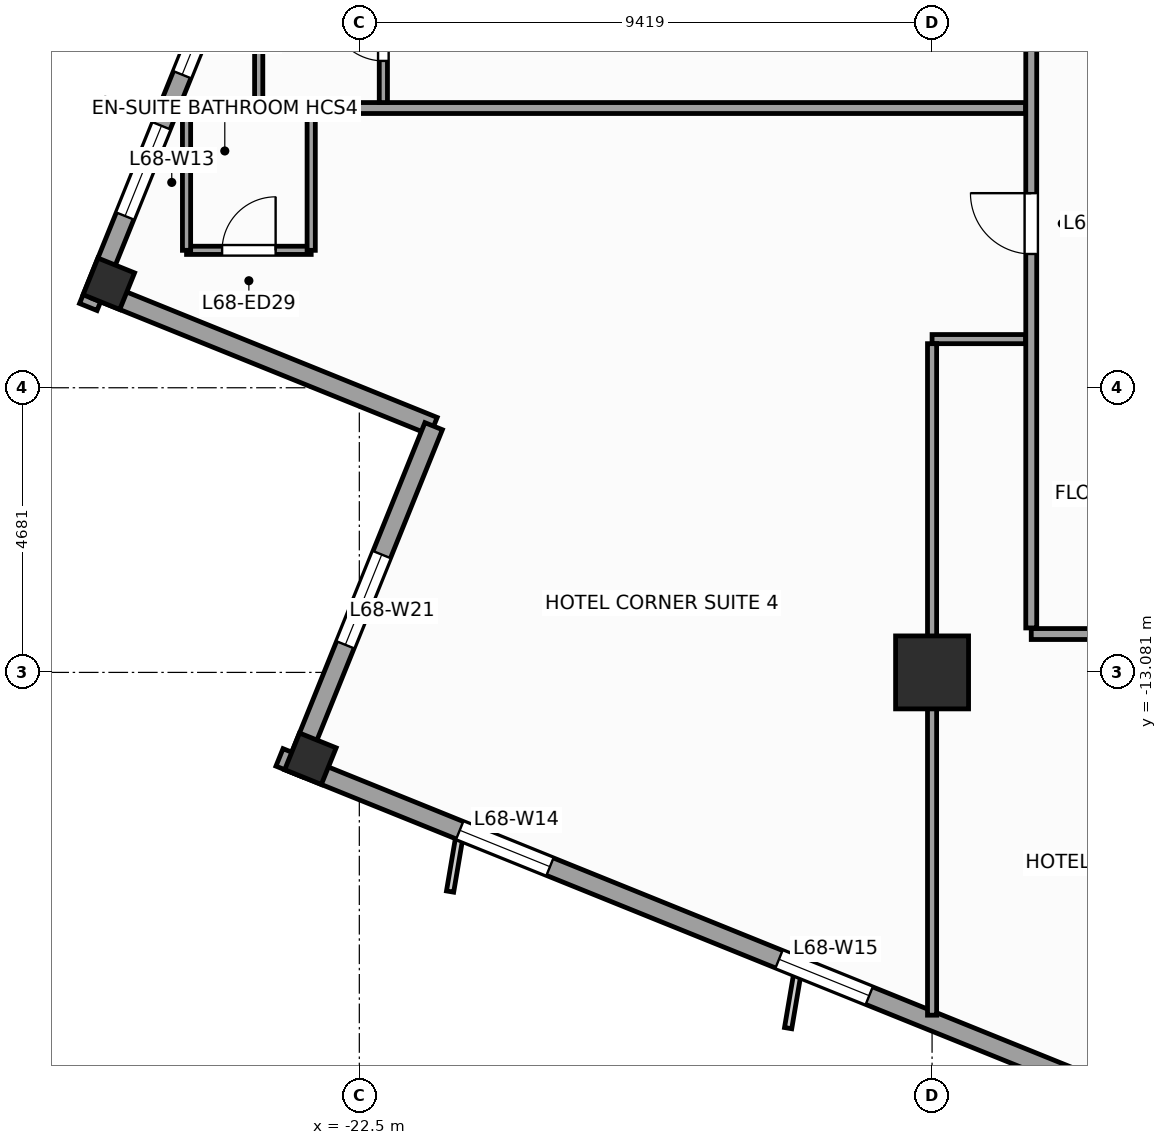
"""IFC4 building model, lengths in metres.
Left out: names, types, materials, properties, quantities, classifications, styles, units other than length and angle.
Written with IfcOpenShell. Run it as: python <this file> out.ifc"""

import sys

from ifc_helpers import new_model, si_unit, direction, frame, frame_2d, origin, origin_2d, place, context, subcontext, project, spatial, rectangle, extrude, source, transform, mapped, element, fill, save


model = new_model("IFC4")
c1 = context("Model", 3, precision=1e-05, world=origin(), true_north=direction((0.0, 1.0)))
c2 = subcontext(c1, "Body", "Model", "MODEL_VIEW")
j1 = project(units=[si_unit("LENGTHUNIT", "METRE"), si_unit("PLANEANGLEUNIT", "RADIAN")], contexts=[c1])
p1 = place(None, origin())
s1 = spatial("IfcSite", under=j1, at=p1, CompositionType="ELEMENT")
p2 = place(p1, origin())
s2 = spatial("IfcBuilding", under=s1, at=p2, CompositionType="ELEMENT")
p3 = place(p2, frame((0.0, 0.0, 279.6)))
s3 = spatial("IfcBuildingStorey", under=s2, at=p3, CompositionType="ELEMENT", Elevation=279.6)
m1 = source(origin(), c2, "Body", "SweptSolid", [
    extrude(rectangle(XDim=1.2, YDim=1.2, at=origin_2d()), origin(), (0.0, 0.0, 1.0), 3.6),
])
p4 = place(p3, frame((-13.081, -13.081, 0.0), z_axis=(0.0, 0.0, 1.0), x_axis=(1.0, 0.0, 0.0)))
e1 = element("IfcColumn", 1, at=p4, inside=s3, PredefinedType="COLUMN", context=c2, shape_type="MappedRepresentation", body=[
    mapped(m1, transform((0.0, 0.0, 0.0), scale=1.0)),
])
m2 = source(origin(), c2, "Body", "SweptSolid", [
    extrude(rectangle(XDim=0.65, YDim=0.65, at=origin_2d()), origin(), (0.0, 0.0, 1.0), 3.6),
])
for number, where, z_axis, x_axis in (
    (2, (-26.62, -6.69, 0.0), (0.0, 0.0, 1.0), (0.375, 0.927, 0.0)),
    (3, (-23.304, -14.501, 0.0), (0.0, 0.0, 1.0), (0.375, 0.927, 0.0)),
):
    element("IfcColumn", number, at=place(p3, frame(where, z_axis=z_axis, x_axis=x_axis)), inside=s3, PredefinedType="COLUMN", context=c2, shape_type="MappedRepresentation", body=[
        mapped(m2, transform((0.0, 0.0, 0.0), scale=1.0)),
    ])
p5 = place(p3, frame((-14.479, 23.813, 0.0), z_axis=(0.0, 0.0, 1.0), x_axis=(-0.374609557019, -0.927182657188, 0.0)))
e4 = element("IfcWall", 4, at=p5, inside=s3, PredefinedType="STANDARD", context=c2, shape_type="SweptSolid", body=[
    extrude(rectangle(XDim=33.31, YDim=0.31, at=frame_2d((16.655, 0.0))), origin(), (0.0, 0.0, 1.0), 2.75),
])
p6 = place(p5, frame((21.73, 0.0, 0.0)))
e5 = element("IfcOpeningElement", 5, at=p6, cuts=e4, PredefinedType="OPENING", context=c2, shape_type="SweptSolid", body=[
    extrude(rectangle(XDim=1.05, YDim=2.25, at=frame_2d((0.525, 1.125))), frame((0.0, 0.165, 0.0), z_axis=(0.0, -1.0, 0.0), x_axis=(1.0, 0.0, 0.0)), (0.0, 0.0, 1.0), 0.33),
])
p7 = place(p5, frame((3.197, 0.0, 0.47)))
e6 = element("IfcOpeningElement", 6, at=p7, cuts=e4, PredefinedType="OPENING", context=c2, shape_type="SweptSolid", body=[
    extrude(rectangle(XDim=1.6, YDim=2.1, at=frame_2d((0.8, 1.05))), frame((0.0, 0.165, 0.0), z_axis=(0.0, -1.0, 0.0), x_axis=(1.0, 0.0, 0.0)), (0.0, 0.0, 1.0), 0.33),
])
p8 = place(p5, frame((8.86, 0.0, 0.47)))
e7 = element("IfcOpeningElement", 7, at=p8, cuts=e4, PredefinedType="OPENING", context=c2, shape_type="SweptSolid", body=[
    extrude(rectangle(XDim=1.6, YDim=2.1, at=frame_2d((0.8, 1.05))), frame((0.0, 0.165, 0.0), z_axis=(0.0, -1.0, 0.0), x_axis=(1.0, 0.0, 0.0)), (0.0, 0.0, 1.0), 0.33),
])
p9 = place(p5, frame((14.439, 0.0, 0.47)))
e8 = element("IfcOpeningElement", 8, at=p9, cuts=e4, PredefinedType="OPENING", context=c2, shape_type="SweptSolid", body=[
    extrude(rectangle(XDim=1.6, YDim=2.1, at=frame_2d((0.8, 1.05))), frame((0.0, 0.165, 0.0), z_axis=(0.0, -1.0, 0.0), x_axis=(1.0, 0.0, 0.0)), (0.0, 0.0, 1.0), 0.33),
])
p10 = place(p5, frame((30.097, 0.0, 0.47)))
e9 = element("IfcOpeningElement", 9, at=p10, cuts=e4, PredefinedType="OPENING", context=c2, shape_type="SweptSolid", body=[
    extrude(rectangle(XDim=1.6, YDim=2.1, at=frame_2d((0.8, 1.05))), frame((0.0, 0.165, 0.0), z_axis=(0.0, -1.0, 0.0), x_axis=(1.0, 0.0, 0.0)), (0.0, 0.0, 1.0), 0.33),
])
p11 = place(p5, frame((27.59, 0.0, 0.47)))
e10 = element("IfcOpeningElement", 10, at=p11, cuts=e4, PredefinedType="OPENING", context=c2, shape_type="SweptSolid", body=[
    extrude(rectangle(XDim=1.6, YDim=2.1, at=frame_2d((0.8, 1.05))), frame((0.0, 0.165, 0.0), z_axis=(0.0, -1.0, 0.0), x_axis=(1.0, 0.0, 0.0)), (0.0, 0.0, 1.0), 0.33),
])
p12 = place(p3, frame((-26.841, -6.784, 0.0), z_axis=(0.0, 0.0, 1.0), x_axis=(0.927171722085, -0.374636620962, 0.0)))
e11 = element("IfcWall", 11, at=p12, inside=s3, PredefinedType="STANDARD", context=c2, shape_type="SweptSolid", body=[
    extrude(rectangle(XDim=6.0, YDim=0.31, at=frame_2d((3.0, 0.0))), origin(), (0.0, 0.0, 1.0), 2.65),
])
p13 = place(p3, frame((-21.278, -9.032, 0.0), z_axis=(0.0, 0.0, 1.0), x_axis=(-0.374602739196, -0.927185411764, 0.0)))
e12 = element("IfcWall", 12, at=p13, inside=s3, PredefinedType="STANDARD", context=c2, shape_type="SweptSolid", body=[
    extrude(rectangle(XDim=6.155, YDim=0.31, at=frame_2d((3.078, 0.0))), origin(), (0.0, 0.0, 1.0), 3.35),
])
p14 = place(p13, frame((2.278, 0.0, 0.47)))
e13 = element("IfcOpeningElement", 13, at=p14, cuts=e12, PredefinedType="OPENING", context=c2, shape_type="SweptSolid", body=[
    extrude(rectangle(XDim=1.6, YDim=2.1, at=frame_2d((0.8, 1.05))), frame((0.0, 0.165, 0.0), z_axis=(0.0, -1.0, 0.0), x_axis=(1.0, 0.0, 0.0)), (0.0, 0.0, 1.0), 0.33),
])
p15 = place(p3, frame((-23.813, -14.479, 0.0), z_axis=(0.0, 0.0, 1.0), x_axis=(0.927182657188, -0.374609557019, 0.0)))
e14 = element("IfcWall", 14, at=p15, inside=s3, PredefinedType="STANDARD", context=c2, shape_type="SweptSolid", body=[
    extrude(rectangle(XDim=33.31, YDim=0.31, at=frame_2d((16.655, 0.0))), origin(), (0.0, 0.0, 1.0), 2.75),
])
p16 = place(p15, frame((3.197, 0.0, 0.47)))
e15 = element("IfcOpeningElement", 15, at=p16, cuts=e14, PredefinedType="OPENING", context=c2, shape_type="SweptSolid", body=[
    extrude(rectangle(XDim=1.6, YDim=2.1, at=frame_2d((0.8, 1.05))), frame((0.0, 0.165, 0.0), z_axis=(0.0, -1.0, 0.0), x_axis=(1.0, 0.0, 0.0)), (0.0, 0.0, 1.0), 0.33),
])
p17 = place(p15, frame((8.86, 0.0, 0.47)))
e16 = element("IfcOpeningElement", 16, at=p17, cuts=e14, PredefinedType="OPENING", context=c2, shape_type="SweptSolid", body=[
    extrude(rectangle(XDim=1.6, YDim=2.1, at=frame_2d((0.8, 1.05))), frame((0.0, 0.165, 0.0), z_axis=(0.0, -1.0, 0.0), x_axis=(1.0, 0.0, 0.0)), (0.0, 0.0, 1.0), 0.33),
])
p18 = place(p15, frame((14.439, 0.0, 0.47)))
e17 = element("IfcOpeningElement", 17, at=p18, cuts=e14, PredefinedType="OPENING", context=c2, shape_type="SweptSolid", body=[
    extrude(rectangle(XDim=1.6, YDim=2.1, at=frame_2d((0.8, 1.05))), frame((0.0, 0.165, 0.0), z_axis=(0.0, -1.0, 0.0), x_axis=(1.0, 0.0, 0.0)), (0.0, 0.0, 1.0), 0.33),
])
p19 = place(p15, frame((21.851, 0.0, 0.47)))
e18 = element("IfcOpeningElement", 18, at=p19, cuts=e14, PredefinedType="OPENING", context=c2, shape_type="SweptSolid", body=[
    extrude(rectangle(XDim=1.6, YDim=2.1, at=frame_2d((0.8, 1.05))), frame((0.0, 0.165, 0.0), z_axis=(0.0, -1.0, 0.0), x_axis=(1.0, 0.0, 0.0)), (0.0, 0.0, 1.0), 0.33),
])
p20 = place(p15, frame((27.847, 0.0, 0.47)))
e19 = element("IfcOpeningElement", 19, at=p20, cuts=e14, PredefinedType="OPENING", context=c2, shape_type="SweptSolid", body=[
    extrude(rectangle(XDim=1.6, YDim=2.1, at=frame_2d((0.8, 1.05))), frame((0.0, 0.165, 0.0), z_axis=(0.0, -1.0, 0.0), x_axis=(1.0, 0.0, 0.0)), (0.0, 0.0, 1.0), 0.33),
])
p21 = place(p3, frame((-11.45, -12.45, 0.0), z_axis=(0.0, 0.0, 1.0), x_axis=(1.0, 0.0, 0.0)))
e20 = element("IfcWall", 20, at=p21, inside=s3, PredefinedType="PARTITIONING", context=c2, shape_type="SweptSolid", body=[
    extrude(rectangle(XDim=21.75, YDim=0.18, at=frame_2d((10.875, 0.0))), origin(), (0.0, 0.0, 1.0), 3.35),
])
p22 = place(p21, frame((12.436, 0.0, 0.0)))
e21 = element("IfcOpeningElement", 21, at=p22, cuts=e20, PredefinedType="OPENING", context=c2, shape_type="SweptSolid", body=[
    extrude(rectangle(XDim=0.95, YDim=2.1, at=frame_2d((0.475, 1.05))), frame((0.0, 0.1, 0.0), z_axis=(0.0, -1.0, 0.0), x_axis=(1.0, 0.0, 0.0)), (0.0, 0.0, 1.0), 0.2),
])
p23 = place(p21, frame((18.186, 0.0, 0.0)))
e22 = element("IfcOpeningElement", 22, at=p23, cuts=e20, PredefinedType="OPENING", context=c2, shape_type="SweptSolid", body=[
    extrude(rectangle(XDim=1.0, YDim=2.15, at=frame_2d((0.5, 1.075))), frame((0.0, 0.1, 0.0), z_axis=(0.0, -1.0, 0.0), x_axis=(1.0, 0.0, 0.0)), (0.0, 0.0, 1.0), 0.2),
])
p24 = place(p21, frame((14.5, 0.0, 0.0)))
e23 = element("IfcOpeningElement", 23, at=p24, cuts=e20, PredefinedType="OPENING", context=c2, shape_type="SweptSolid", body=[
    extrude(rectangle(XDim=1.0, YDim=2.15, at=frame_2d((0.5, 1.075))), frame((0.0, 0.1, 0.0), z_axis=(0.0, -1.0, 0.0), x_axis=(1.0, 0.0, 0.0)), (0.0, 0.0, 1.0), 0.2),
])
p25 = place(p21, frame((8.7, 0.0, 0.0)))
e24 = element("IfcOpeningElement", 24, at=p25, cuts=e20, PredefinedType="OPENING", context=c2, shape_type="SweptSolid", body=[
    extrude(rectangle(XDim=1.0, YDim=2.15, at=frame_2d((0.5, 1.075))), frame((0.0, 0.1, 0.0), z_axis=(0.0, -1.0, 0.0), x_axis=(1.0, 0.0, 0.0)), (0.0, 0.0, 1.0), 0.2),
])
p26 = place(p21, frame((3.139, 0.0, 0.0)))
e25 = element("IfcOpeningElement", 25, at=p26, cuts=e20, PredefinedType="OPENING", context=c2, shape_type="SweptSolid", body=[
    extrude(rectangle(XDim=1.0, YDim=2.15, at=frame_2d((0.5, 1.075))), frame((0.0, 0.1, 0.0), z_axis=(0.0, -1.0, 0.0), x_axis=(1.0, 0.0, 0.0)), (0.0, 0.0, 1.0), 0.2),
])
p27 = place(p3, frame((-11.45, -12.35, 0.0), z_axis=(0.0, 0.0, 1.0), x_axis=(0.0, 1.0, 0.0)))
e26 = element("IfcWall", 26, at=p27, inside=s3, PredefinedType="PARTITIONING", context=c2, shape_type="SweptSolid", body=[
    extrude(rectangle(XDim=23.7, YDim=0.18, at=frame_2d((11.85, 0.0))), origin(), (0.0, 0.0, 1.0), 3.35),
])
p28 = place(p27, frame((13.75, 0.0, 0.0)))
e27 = element("IfcOpeningElement", 27, at=p28, cuts=e26, PredefinedType="OPENING", context=c2, shape_type="SweptSolid", body=[
    extrude(rectangle(XDim=1.0, YDim=2.15, at=frame_2d((0.5, 1.075))), frame((0.0, 0.1, 0.0), z_axis=(0.0, -1.0, 0.0), x_axis=(1.0, 0.0, 0.0)), (0.0, 0.0, 1.0), 0.2),
])
p29 = place(p27, frame((17.55, 0.0, 0.0)))
e28 = element("IfcOpeningElement", 28, at=p29, cuts=e26, PredefinedType="OPENING", context=c2, shape_type="SweptSolid", body=[
    extrude(rectangle(XDim=1.0, YDim=2.15, at=frame_2d((0.5, 1.075))), frame((0.0, 0.1, 0.0), z_axis=(0.0, -1.0, 0.0), x_axis=(1.0, 0.0, 0.0)), (0.0, 0.0, 1.0), 0.2),
])
p30 = place(p27, frame((6.15, 0.0, 0.0)))
e29 = element("IfcOpeningElement", 29, at=p30, cuts=e26, PredefinedType="OPENING", context=c2, shape_type="SweptSolid", body=[
    extrude(rectangle(XDim=1.0, YDim=2.15, at=frame_2d((0.5, 1.075))), frame((0.0, 0.1, 0.0), z_axis=(0.0, -1.0, 0.0), x_axis=(1.0, 0.0, 0.0)), (0.0, 0.0, 1.0), 0.2),
])
p31 = place(p27, frame((9.95, 0.0, 0.0)))
e30 = element("IfcOpeningElement", 30, at=p31, cuts=e26, PredefinedType="OPENING", context=c2, shape_type="SweptSolid", body=[
    extrude(rectangle(XDim=1.0, YDim=2.15, at=frame_2d((0.5, 1.075))), frame((0.0, 0.1, 0.0), z_axis=(0.0, -1.0, 0.0), x_axis=(1.0, 0.0, 0.0)), (0.0, 0.0, 1.0), 0.2),
])
p32 = place(p3, frame((-11.545, -3.8, 0.0), z_axis=(0.0, 0.0, 1.0), x_axis=(-1.0, 0.0, 0.0)))
e31 = element("IfcWall", 31, at=p32, inside=s3, PredefinedType="PARTITIONING", context=c2, shape_type="SweptSolid", body=[
    extrude(rectangle(XDim=13.993, YDim=0.18, at=frame_2d((6.997, 0.0))), origin(), (0.0, 0.0, 1.0), 3.35),
])
p33 = place(p3, frame((-11.545, -7.6, 0.0), z_axis=(0.0, 0.0, 1.0), x_axis=(-1.0, 0.0, 0.0)))
e32 = element("IfcWall", 32, at=p33, inside=s3, PredefinedType="PARTITIONING", context=c2, shape_type="SweptSolid", body=[
    extrude(rectangle(XDim=1.536, YDim=0.15, at=frame_2d((0.768, 0.0))), origin(), (0.0, 0.0, 1.0), 3.35),
])
p34 = place(p3, frame((-13.081, -7.675, 0.0), z_axis=(0.0, 0.0, 1.0), x_axis=(0.0, -1.0, 0.0)))
e33 = element("IfcWall", 33, at=p34, inside=s3, PredefinedType="PARTITIONING", context=c2, shape_type="SweptSolid", body=[
    extrude(rectangle(XDim=11.043, YDim=0.15, at=frame_2d((5.521, 0.0))), origin(), (0.0, 0.0, 1.0), 2.45),
])
p35 = place(p3, frame((-25.342, -6.14, 0.0), z_axis=(0.0, 0.0, 1.0), x_axis=(1.0, 0.0, 0.0)))
e34 = element("IfcWall", 34, at=p35, inside=s3, PredefinedType="PARTITIONING", context=c2, shape_type="SweptSolid", body=[
    extrude(rectangle(XDim=2.05, YDim=0.135, at=frame_2d((1.025, 0.0))), origin(), (0.0, 0.0, 1.0), 3.35),
])
p36 = place(p35, frame((0.585, 0.0, 0.0)))
e35 = element("IfcOpeningElement", 35, at=p36, cuts=e34, PredefinedType="OPENING", context=c2, shape_type="SweptSolid", body=[
    extrude(rectangle(XDim=0.88, YDim=2.1, at=frame_2d((0.44, 1.05))), frame((0.0, 0.078, 0.0), z_axis=(0.0, -1.0, 0.0), x_axis=(1.0, 0.0, 0.0)), (0.0, 0.0, 1.0), 0.155),
])
p37 = place(p3, frame((-23.292, -6.14, 0.0), z_axis=(0.0, 0.0, 1.0), x_axis=(0.0, 1.0, 0.0)))
e36 = element("IfcWall", 36, at=p37, inside=s3, PredefinedType="PARTITIONING", context=c2, shape_type="SweptSolid", body=[
    extrude(rectangle(XDim=2.25, YDim=0.135, at=frame_2d((1.125, 0.0))), origin(), (0.0, 0.0, 1.0), 2.95),
])
p38 = place(p3, frame((-25.342, -6.14, 0.0), z_axis=(0.0, 0.0, 1.0), x_axis=(0.0, 1.0, 0.0)))
e37 = element("IfcWall", 37, at=p38, inside=s3, PredefinedType="PARTITIONING", context=c2, shape_type="SweptSolid", body=[
    extrude(rectangle(XDim=2.25, YDim=0.135, at=frame_2d((1.125, 0.0))), origin(), (0.0, 0.0, 1.0), 2.75),
])
p39 = place(p3, frame((-22.105, -3.71, 0.0), z_axis=(0.0, 0.0, 1.0), x_axis=(0.0, 1.0, 0.0)))
e38 = element("IfcWall", 38, at=p39, inside=s3, PredefinedType="PARTITIONING", context=c2, shape_type="SweptSolid", body=[
    extrude(rectangle(XDim=2.25, YDim=0.135, at=frame_2d((1.125, 0.0))), origin(), (0.0, 0.0, 1.0), 3.35),
])
p40 = place(p39, frame((0.685, 0.0, 0.0)))
e39 = element("IfcOpeningElement", 39, at=p40, cuts=e38, PredefinedType="OPENING", context=c2, shape_type="SweptSolid", body=[
    extrude(rectangle(XDim=0.88, YDim=2.1, at=frame_2d((0.44, 1.05))), frame((0.0, 0.078, 0.0), z_axis=(0.0, -1.0, 0.0), x_axis=(1.0, 0.0, 0.0)), (0.0, 0.0, 1.0), 0.155),
])
p41 = place(p3, frame((-24.155, -3.71, 0.0), z_axis=(0.0, 0.0, 1.0), x_axis=(0.0, 1.0, 0.0)))
e40 = element("IfcWall", 40, at=p41, inside=s3, PredefinedType="PARTITIONING", context=c2, shape_type="SweptSolid", body=[
    extrude(rectangle(XDim=2.25, YDim=0.135, at=frame_2d((1.125, 0.0))), origin(), (0.0, 0.0, 1.0), 3.35),
])
m3 = source(origin(), c2, "Body", "SweptSolid", [
    extrude(rectangle(XDim=1.6, YDim=2.1, at=frame_2d((0.8, 1.05))), frame((0.0, 0.03, 0.0), z_axis=(0.0, -1.0, 0.0), x_axis=(1.0, 0.0, 0.0)), (0.0, 0.0, 1.0), 0.06),
])
p42 = place(p10, origin())
e41 = element("IfcWindow", 41, at=p42, inside=s3, PartitioningType="SINGLE_PANEL", PredefinedType="WINDOW", context=c2, shape_type="MappedRepresentation", body=[
    mapped(m3, transform((0.0, 0.0, 0.0), scale=1.0)),
])
fill(e9, e41)
p43 = place(p16, origin())
e42 = element("IfcWindow", 42, at=p43, inside=s3, PartitioningType="SINGLE_PANEL", PredefinedType="WINDOW", context=c2, shape_type="MappedRepresentation", body=[
    mapped(m3, transform((0.0, 0.0, 0.0), scale=1.0)),
])
fill(e15, e42)
p44 = place(p17, origin())
e43 = element("IfcWindow", 43, at=p44, inside=s3, PartitioningType="SINGLE_PANEL", PredefinedType="WINDOW", context=c2, shape_type="MappedRepresentation", body=[
    mapped(m3, transform((0.0, 0.0, 0.0), scale=1.0)),
])
fill(e16, e43)
p45 = place(p14, origin())
e44 = element("IfcWindow", 44, at=p45, inside=s3, PartitioningType="SINGLE_PANEL", PredefinedType="WINDOW", context=c2, shape_type="MappedRepresentation", body=[
    mapped(m3, transform((0.0, 0.0, 0.0), scale=1.0)),
])
fill(e13, e44)
m4 = source(origin(), c2, "Body", "SweptSolid", [
    extrude(rectangle(XDim=1.0, YDim=2.15, at=frame_2d((0.5, 1.075))), frame((0.0, 0.025, 0.0), z_axis=(0.0, -1.0, 0.0), x_axis=(1.0, 0.0, 0.0)), (0.0, 0.0, 1.0), 0.05),
])
p46 = place(p30, origin())
e45 = element("IfcDoor", 45, at=p46, inside=s3, OperationType="SINGLE_SWING_RIGHT", PredefinedType="DOOR", context=c2, shape_type="MappedRepresentation", body=[
    mapped(m4, transform((0.0, 0.0, 0.0), scale=1.0)),
])
fill(e29, e45)
m5 = source(origin(), c2, "Body", "SweptSolid", [
    extrude(rectangle(XDim=0.88, YDim=2.1, at=frame_2d((0.44, 1.05))), frame((0.0, 0.025, 0.0), z_axis=(0.0, -1.0, 0.0), x_axis=(1.0, 0.0, 0.0)), (0.0, 0.0, 1.0), 0.05),
])
p47 = place(p36, origin())
e46 = element("IfcDoor", 46, at=p47, inside=s3, OperationType="SINGLE_SWING_RIGHT", PredefinedType="DOOR", context=c2, shape_type="MappedRepresentation", body=[
    mapped(m5, transform((0.0, 0.0, 0.0), scale=1.0)),
])
fill(e35, e46)
p48 = place(p40, origin())
e47 = element("IfcDoor", 47, at=p48, inside=s3, OperationType="SINGLE_SWING_RIGHT", PredefinedType="DOOR", context=c2, shape_type="MappedRepresentation", body=[
    mapped(m5, transform((0.0, 0.0, 0.0), scale=1.0)),
])
fill(e39, e47)
p49 = place(p11, origin())
e48 = element("IfcWindow", 48, at=p49, inside=s3, PartitioningType="SINGLE_PANEL", PredefinedType="WINDOW", context=c2, shape_type="MappedRepresentation", body=[
    mapped(m3, transform((0.0, 0.0, 0.0), scale=1.0)),
])
fill(e10, e48)
save(model, sys.argv[1])
